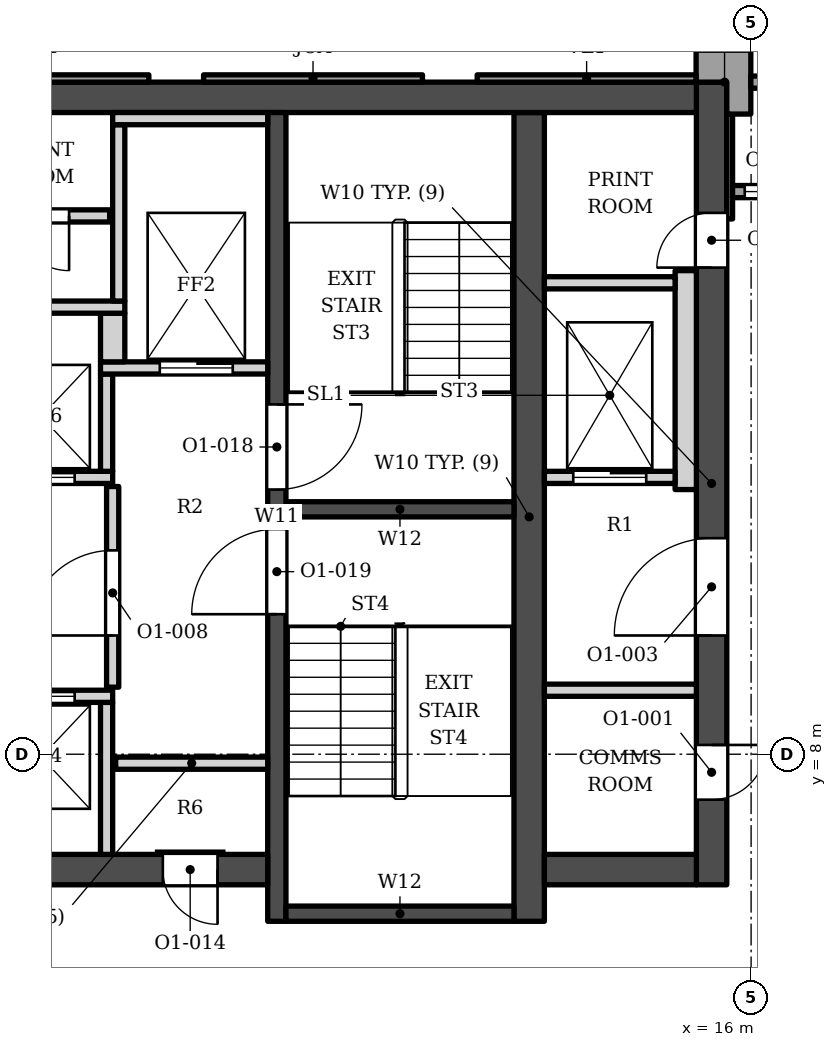
"""IFC4 building model, lengths in metres.
Left out: names, types, materials, properties, quantities, classifications, styles, units other than length and angle.
Written with IfcOpenShell. Run it as: python <this file> out.ifc"""

import sys

from ifc_helpers import new_model, si_unit, direction, frame, frame_2d, origin, place, context, subcontext, project, spatial, polyline, rectangle, outline, extrude, element, fill, save


model = new_model("IFC4")
c1 = context("Model", 3, precision=1e-05, world=origin(), true_north=direction((0.0, 1.0)))
c2 = subcontext(c1, "Body", "Model", "MODEL_VIEW")
j1 = project(units=[si_unit("LENGTHUNIT", "METRE"), si_unit("PLANEANGLEUNIT", "RADIAN")], contexts=[c1])
p1 = place(None, origin())
s1 = spatial("IfcSite", under=j1, at=p1, CompositionType="ELEMENT")
p2 = place(p1, origin())
s2 = spatial("IfcBuilding", under=s1, at=p2, CompositionType="ELEMENT")
p3 = place(p2, frame((0.0, 0.0, 144.6)))
s3 = spatial("IfcBuildingStorey", under=s2, at=p3, CompositionType="ELEMENT", Elevation=144.6)
p4 = place(p3, frame((-15.1, 18.802, 0.0), z_axis=(0.0, 0.0, 1.0), x_axis=(1.0, 0.0, 0.0)))
e1 = element("IfcWall", 1, at=p4, inside=s3, PredefinedType="SHEAR", context=c2, shape_type="SweptSolid", body=[
    extrude(rectangle(XDim=30.2, YDim=0.5, at=frame_2d((15.1, 0.0))), origin(), (0.0, 0.0, 1.0), 3.9),
])
p5 = place(p3, frame((12.35, 5.253, 0.0), z_axis=(0.0, 0.0, 1.0), x_axis=(0.0, 1.0, 0.0)))
e2 = element("IfcWall", 2, at=p5, inside=s3, PredefinedType="SHEAR", context=c2, shape_type="SweptSolid", body=[
    extrude(rectangle(XDim=13.3, YDim=0.5, at=frame_2d((6.65, 0.0))), origin(), (0.0, 0.0, 1.0), 3.9),
])
p6 = place(p3, frame((8.2, 5.253, 0.0), z_axis=(0.0, 0.0, 1.0), x_axis=(0.0, 1.0, 0.0)))
e3 = element("IfcWall", 3, at=p6, inside=s3, PredefinedType="SHEAR", context=c2, shape_type="SweptSolid", body=[
    extrude(rectangle(XDim=13.3, YDim=0.3, at=frame_2d((6.65, 0.0))), origin(), (0.0, 0.0, 1.0), 3.9),
])
p7 = place(p6, frame((7.1, 0.0, 0.0)))
e4 = element("IfcOpeningElement", 4, at=p7, cuts=e3, PredefinedType="OPENING", context=c2, shape_type="SweptSolid", body=[
    extrude(rectangle(XDim=1.4, YDim=2.1, at=frame_2d((0.7, 1.05))), frame((0.0, 0.16, 0.0), z_axis=(0.0, -1.0, 0.0), x_axis=(1.0, 0.0, 0.0)), (0.0, 0.0, 1.0), 0.32),
])
p8 = place(p6, frame((5.05, 0.0, 0.0)))
e5 = element("IfcOpeningElement", 5, at=p8, cuts=e3, PredefinedType="OPENING", context=c2, shape_type="SweptSolid", body=[
    extrude(rectangle(XDim=1.4, YDim=2.1, at=frame_2d((0.7, 1.05))), frame((0.0, 0.16, 0.0), z_axis=(0.0, -1.0, 0.0), x_axis=(1.0, 0.0, 0.0)), (0.0, 0.0, 1.0), 0.32),
])
for number, where, z_axis, x_axis in (
    (6, (8.35, 12.028, 0.0), (0.0, 0.0, 1.0), (1.0, 0.0, 0.0)),
    (7, (8.35, 5.378, 0.0), (0.0, 0.0, 1.0), (1.0, 0.0, 0.0)),
):
    element("IfcWall", number, at=place(p3, frame(where, z_axis=z_axis, x_axis=x_axis)), inside=s3, PredefinedType="SHEAR", context=c2, shape_type="SweptSolid", body=[
        extrude(rectangle(XDim=3.75, YDim=0.25, at=frame_2d((1.875, 0.0))), origin(), (0.0, 0.0, 1.0), 3.9),
    ])
p9 = place(p3, frame((1.0, 6.103, 0.0), z_axis=(0.0, 0.0, 1.0), x_axis=(1.0, 0.0, 0.0)))
e8 = element("IfcWall", 8, at=p9, inside=s3, PredefinedType="SHEAR", context=c2, shape_type="SweptSolid", body=[
    extrude(rectangle(XDim=7.05, YDim=0.5, at=frame_2d((3.525, 0.0))), origin(), (0.0, 0.0, 1.0), 3.9),
])
p10 = place(p9, frame((5.325, 0.0, 0.0)))
e9 = element("IfcOpeningElement", 9, at=p10, cuts=e8, PredefinedType="OPENING", context=c2, shape_type="SweptSolid", body=[
    extrude(rectangle(XDim=0.9, YDim=2.1, at=frame_2d((0.45, 1.05))), frame((0.0, 0.26, 0.0), z_axis=(0.0, -1.0, 0.0), x_axis=(1.0, 0.0, 0.0)), (0.0, 0.0, 1.0), 0.52),
])
p11 = place(p3, frame((12.6, 6.103, 0.0), z_axis=(0.0, 0.0, 1.0), x_axis=(1.0, 0.0, 0.0)))
e10 = element("IfcWall", 10, at=p11, inside=s3, PredefinedType="SHEAR", context=c2, shape_type="SweptSolid", body=[
    extrude(rectangle(XDim=2.5, YDim=0.5, at=frame_2d((1.25, 0.0))), origin(), (0.0, 0.0, 1.0), 3.9),
])
p12 = place(p3, frame((15.35, 5.853, 0.0), z_axis=(0.0, 0.0, 1.0), x_axis=(0.0, 1.0, 0.0)))
e11 = element("IfcWall", 11, at=p12, inside=s3, PredefinedType="SHEAR", context=c2, shape_type="SweptSolid", body=[
    extrude(rectangle(XDim=13.2, YDim=0.5, at=frame_2d((6.6, 0.0))), origin(), (0.0, 0.0, 1.0), 3.9),
])
p13 = place(p12, frame((4.1, 0.0, 0.0)))
e12 = element("IfcOpeningElement", 12, at=p13, cuts=e11, PredefinedType="OPENING", context=c2, shape_type="SweptSolid", body=[
    extrude(rectangle(XDim=1.6, YDim=2.1, at=frame_2d((0.8, 1.05))), frame((0.0, 0.26, 0.0), z_axis=(0.0, -1.0, 0.0), x_axis=(1.0, 0.0, 0.0)), (0.0, 0.0, 1.0), 0.52),
])
p14 = place(p12, frame((1.4, 0.0, 0.0)))
e13 = element("IfcOpeningElement", 13, at=p14, cuts=e11, PredefinedType="OPENING", context=c2, shape_type="SweptSolid", body=[
    extrude(rectangle(XDim=0.9, YDim=2.1, at=frame_2d((0.45, 1.05))), frame((0.0, 0.26, 0.0), z_axis=(0.0, -1.0, 0.0), x_axis=(1.0, 0.0, 0.0)), (0.0, 0.0, 1.0), 0.52),
])
p15 = place(p12, frame((10.15, 0.0, 0.0)))
e14 = element("IfcOpeningElement", 14, at=p15, cuts=e11, PredefinedType="OPENING", context=c2, shape_type="SweptSolid", body=[
    extrude(rectangle(XDim=0.9, YDim=2.1, at=frame_2d((0.45, 1.05))), frame((0.0, 0.26, 0.0), z_axis=(0.0, -1.0, 0.0), x_axis=(1.0, 0.0, 0.0)), (0.0, 0.0, 1.0), 0.52),
])
p16 = place(p3, origin())
e15 = element("IfcWall", 15, at=p16, inside=s3, PredefinedType="SOLIDWALL", context=c2, shape_type="SweptSolid", body=[
    extrude(outline(polyline([(15.995, 18.528), (15.995, 19.578), (15.095, 19.578), (15.095, 19.052), (15.6, 19.052), (15.6, 18.528), (15.995, 18.528)])), origin(), (0.0, 0.0, 1.0), 3.0),
])
p17 = place(p3, origin())
e16 = element("IfcWall", 16, at=p17, inside=s3, PredefinedType="SOLIDWALL", context=c2, shape_type="SweptSolid", body=[
    extrude(outline(polyline([(15.695, 18.528), (15.6, 18.528), (15.6, 16.802), (15.695, 16.802), (15.695, 18.528)])), origin(), (0.0, 0.0, 1.0), 3.0),
])
p18 = place(p3, frame((19.595, 19.052, 0.0), z_axis=(0.0, 0.0, 1.0), x_axis=(-1.0, 0.0, 0.0)))
e17 = element("IfcWall", 17, at=p18, inside=s3, PredefinedType="SOLIDWALL", context=c2, shape_type="SweptSolid", body=[
    extrude(rectangle(XDim=3.6, YDim=0.2, at=frame_2d((1.8, 0.0))), origin(), (0.0, 0.0, 1.0), 3.0),
])
p19 = place(p3, frame((19.895, 17.252, 0.0), z_axis=(0.0, 0.0, 1.0), x_axis=(-1.0, 0.0, 0.0)))
e18 = element("IfcWall", 18, at=p19, inside=s3, PredefinedType="ELEMENTEDWALL", context=c2, shape_type="SweptSolid", body=[
    extrude(rectangle(XDim=4.2, YDim=0.2, at=frame_2d((2.1, 0.0))), origin(), (0.0, 0.0, 1.0), 3.0),
])
p20 = place(p19, frame((0.2, 0.0, 0.45)))
e19 = element("IfcOpeningElement", 19, at=p20, cuts=e18, PredefinedType="OPENING", context=c2, shape_type="SweptSolid", body=[
    extrude(rectangle(XDim=2.4, YDim=2.25, at=frame_2d((1.2, 1.125))), frame((0.0, 0.11, 0.0), z_axis=(0.0, -1.0, 0.0), x_axis=(1.0, 0.0, 0.0)), (0.0, 0.0, 1.0), 0.22),
])
p21 = place(p19, frame((2.8, 0.0, 0.0)))
e20 = element("IfcOpeningElement", 20, at=p21, cuts=e18, PredefinedType="OPENING", context=c2, shape_type="SweptSolid", body=[
    extrude(rectangle(XDim=1.2, YDim=2.7, at=frame_2d((0.6, 1.35))), frame((0.0, 0.11, 0.0), z_axis=(0.0, -1.0, 0.0), x_axis=(1.0, 0.0, 0.0)), (0.0, 0.0, 1.0), 0.22),
])
p22 = place(p3, origin())
e21 = element("IfcWall", 21, at=p22, inside=s3, PredefinedType="ELEMENTEDWALL", context=c2, shape_type="SweptSolid", body=[
    extrude(outline(polyline([(11.495, 19.173), (11.495, 19.052), (15.095, 19.052), (15.095, 19.173), (11.495, 19.173)])), origin(), (0.0, 0.0, 1.0), 3.0),
])
p23 = place(p3, origin())
e22 = element("IfcWall", 22, at=p23, inside=s3, PredefinedType="SOLIDWALL", context=c2, shape_type="SweptSolid", body=[
    extrude(outline(polyline([(6.995, 19.173), (6.995, 19.052), (10.595, 19.052), (10.595, 19.173), (6.995, 19.173)])), origin(), (0.0, 0.0, 1.0), 3.0),
])
p24 = place(p3, origin())
e23 = element("IfcWall", 23, at=p24, inside=s3, PredefinedType="ELEMENTEDWALL", context=c2, shape_type="SweptSolid", body=[
    extrude(outline(polyline([(2.495, 19.173), (2.495, 19.052), (6.095, 19.052), (6.095, 19.173), (2.495, 19.173)])), origin(), (0.0, 0.0, 1.0), 3.0),
])
for number, where, z_axis, x_axis in (
    (24, (5.4, 6.353, 0.0), (0.0, 0.0, 1.0), (0.0, 1.0, 0.0)),
    (25, (5.55, 7.853, 0.0), (0.0, 0.0, 1.0), (1.0, 0.0, 0.0)),
):
    element("IfcWall", number, at=place(p3, frame(where, z_axis=z_axis, x_axis=x_axis)), inside=s3, PredefinedType="SOLIDWALL", context=c2, shape_type="SweptSolid", body=[
        extrude(rectangle(XDim=2.5, YDim=0.2, at=frame_2d((1.25, 0.0))), origin(), (0.0, 0.0, 1.0), 3.73),
    ])
p25 = place(p3, frame((1.0, 8.953, 0.0), z_axis=(0.0, 0.0, 1.0), x_axis=(1.0, 0.0, 0.0)))
e26 = element("IfcWall", 26, at=p25, inside=s3, PredefinedType="SOLIDWALL", context=c2, shape_type="SweptSolid", body=[
    extrude(rectangle(XDim=4.5, YDim=0.2, at=frame_2d((2.25, 0.0))), origin(), (0.0, 0.0, 1.0), 3.73),
])
p26 = place(p25, frame((0.625, 0.0, 0.0)))
e27 = element("IfcOpeningElement", 27, at=p26, cuts=e26, PredefinedType="OPENING", context=c2, shape_type="SweptSolid", body=[
    extrude(rectangle(XDim=1.1, YDim=2.1, at=frame_2d((0.55, 1.05))), frame((0.0, 0.11, 0.0), z_axis=(0.0, -1.0, 0.0), x_axis=(1.0, 0.0, 0.0)), (0.0, 0.0, 1.0), 0.22),
])
p27 = place(p25, frame((2.775, 0.0, 0.0)))
e28 = element("IfcOpeningElement", 28, at=p27, cuts=e26, PredefinedType="OPENING", context=c2, shape_type="SweptSolid", body=[
    extrude(rectangle(XDim=1.1, YDim=2.1, at=frame_2d((0.55, 1.05))), frame((0.0, 0.11, 0.0), z_axis=(0.0, -1.0, 0.0), x_axis=(1.0, 0.0, 0.0)), (0.0, 0.0, 1.0), 0.22),
])
p28 = place(p3, frame((12.6, 9.052, 0.0), z_axis=(0.0, 0.0, 1.0), x_axis=(1.0, 0.0, 0.0)))
e29 = element("IfcWall", 29, at=p28, inside=s3, PredefinedType="PARTITIONING", context=c2, shape_type="SweptSolid", body=[
    extrude(rectangle(XDim=2.5, YDim=0.2, at=frame_2d((1.25, 0.0))), origin(), (0.0, 0.0, 1.0), 3.73),
])
p29 = place(p3, frame((5.5, 9.103, 0.0), z_axis=(0.0, 0.0, 1.0), x_axis=(0.0, 1.0, 0.0)))
e30 = element("IfcWall", 30, at=p29, inside=s3, PredefinedType="SOLIDWALL", context=c2, shape_type="SweptSolid", body=[
    extrude(rectangle(XDim=3.3, YDim=0.2, at=frame_2d((1.65, 0.0))), origin(), (0.0, 0.0, 1.0), 3.73),
])
p30 = place(p29, frame((0.85, 0.0, 0.0)))
e31 = element("IfcOpeningElement", 31, at=p30, cuts=e30, PredefinedType="OPENING", context=c2, shape_type="SweptSolid", body=[
    extrude(rectangle(XDim=1.4, YDim=2.1, at=frame_2d((0.7, 1.05))), frame((0.0, 0.11, 0.0), z_axis=(0.0, -1.0, 0.0), x_axis=(1.0, 0.0, 0.0)), (0.0, 0.0, 1.0), 0.22),
])
p31 = place(p3, frame((14.925, 12.353, 0.0), z_axis=(0.0, 0.0, 1.0), x_axis=(0.0, 1.0, 0.0)))
e32 = element("IfcWall", 32, at=p31, inside=s3, PredefinedType="SOLIDWALL", context=c2, shape_type="SweptSolid", body=[
    extrude(rectangle(XDim=3.6, YDim=0.35, at=frame_2d((1.8, 0.0))), origin(), (0.0, 0.0, 1.0), 3.73),
])
p32 = place(p3, frame((-1.5, 12.552, 0.0), z_axis=(0.0, 0.0, 1.0), x_axis=(1.0, 0.0, 0.0)))
e33 = element("IfcWall", 33, at=p32, inside=s3, PredefinedType="SOLIDWALL", context=c2, shape_type="SweptSolid", body=[
    extrude(rectangle(XDim=7.0, YDim=0.2, at=frame_2d((3.5, 0.0))), origin(), (0.0, 0.0, 1.0), 3.73),
])
p33 = place(p32, frame((3.075, 0.0, 0.0)))
e34 = element("IfcOpeningElement", 34, at=p33, cuts=e33, PredefinedType="OPENING", context=c2, shape_type="SweptSolid", body=[
    extrude(rectangle(XDim=1.1, YDim=2.1, at=frame_2d((0.55, 1.05))), frame((0.0, 0.11, 0.0), z_axis=(0.0, -1.0, 0.0), x_axis=(1.0, 0.0, 0.0)), (0.0, 0.0, 1.0), 0.22),
])
p34 = place(p32, frame((5.275, 0.0, 0.0)))
e35 = element("IfcOpeningElement", 35, at=p34, cuts=e33, PredefinedType="OPENING", context=c2, shape_type="SweptSolid", body=[
    extrude(rectangle(XDim=1.1, YDim=2.1, at=frame_2d((0.55, 1.05))), frame((0.0, 0.11, 0.0), z_axis=(0.0, -1.0, 0.0), x_axis=(1.0, 0.0, 0.0)), (0.0, 0.0, 1.0), 0.22),
])
p35 = place(p3, frame((12.6, 12.552, 0.0), z_axis=(0.0, 0.0, 1.0), x_axis=(1.0, 0.0, 0.0)))
e36 = element("IfcWall", 36, at=p35, inside=s3, PredefinedType="SOLIDWALL", context=c2, shape_type="SweptSolid", body=[
    extrude(rectangle(XDim=2.15, YDim=0.2, at=frame_2d((1.075, 0.0))), origin(), (0.0, 0.0, 1.0), 3.73),
])
p36 = place(p35, frame((0.475, 0.0, 0.0)))
e37 = element("IfcOpeningElement", 37, at=p36, cuts=e36, PredefinedType="OPENING", context=c2, shape_type="SweptSolid", body=[
    extrude(rectangle(XDim=1.2, YDim=2.1, at=frame_2d((0.6, 1.05))), frame((0.0, 0.11, 0.0), z_axis=(0.0, -1.0, 0.0), x_axis=(1.0, 0.0, 0.0)), (0.0, 0.0, 1.0), 0.22),
])
p37 = place(p3, frame((5.4, 12.653, 0.0), z_axis=(0.0, 0.0, 1.0), x_axis=(0.0, 1.0, 0.0)))
e38 = element("IfcWall", 38, at=p37, inside=s3, PredefinedType="SOLIDWALL", context=c2, shape_type="SweptSolid", body=[
    extrude(rectangle(XDim=1.6, YDim=0.2, at=frame_2d((0.8, 0.0))), origin(), (0.0, 0.0, 1.0), 3.73),
])
p38 = place(p3, frame((5.3, 14.353, 0.0), z_axis=(0.0, 0.0, 1.0), x_axis=(1.0, 0.0, 0.0)))
e39 = element("IfcWall", 39, at=p38, inside=s3, PredefinedType="SOLIDWALL", context=c2, shape_type="SweptSolid", body=[
    extrude(rectangle(XDim=2.75, YDim=0.2, at=frame_2d((1.375, 0.0))), origin(), (0.0, 0.0, 1.0), 3.73),
])
p39 = place(p38, frame((0.975, 0.0, 0.0)))
e40 = element("IfcOpeningElement", 40, at=p39, cuts=e39, PredefinedType="OPENING", context=c2, shape_type="SweptSolid", body=[
    extrude(rectangle(XDim=1.2, YDim=2.1, at=frame_2d((0.6, 1.05))), frame((0.0, 0.11, 0.0), z_axis=(0.0, -1.0, 0.0), x_axis=(1.0, 0.0, 0.0)), (0.0, 0.0, 1.0), 0.22),
])
p40 = place(p3, frame((5.5, 14.453, 0.0), z_axis=(0.0, 0.0, 1.0), x_axis=(0.0, 1.0, 0.0)))
e41 = element("IfcWall", 41, at=p40, inside=s3, PredefinedType="SOLIDWALL", context=c2, shape_type="SweptSolid", body=[
    extrude(rectangle(XDim=0.8, YDim=0.4, at=frame_2d((0.4, 0.0))), origin(), (0.0, 0.0, 1.0), 3.73),
])
p41 = place(p3, frame((-1.5, 15.353, 0.0), z_axis=(0.0, 0.0, 1.0), x_axis=(1.0, 0.0, 0.0)))
e42 = element("IfcWall", 42, at=p41, inside=s3, PredefinedType="SOLIDWALL", context=c2, shape_type="SweptSolid", body=[
    extrude(rectangle(XDim=7.2, YDim=0.2, at=frame_2d((3.6, 0.0))), origin(), (0.0, 0.0, 1.0), 3.73),
])
p42 = place(p3, frame((5.6, 15.453, 0.0), z_axis=(0.0, 0.0, 1.0), x_axis=(0.0, 1.0, 0.0)))
e43 = element("IfcWall", 43, at=p42, inside=s3, PredefinedType="SOLIDWALL", context=c2, shape_type="SweptSolid", body=[
    extrude(rectangle(XDim=2.9, YDim=0.2, at=frame_2d((1.45, 0.0))), origin(), (0.0, 0.0, 1.0), 3.73),
])
p43 = place(p3, frame((12.6, 15.753, 0.0), z_axis=(0.0, 0.0, 1.0), x_axis=(1.0, 0.0, 0.0)))
e44 = element("IfcWall", 44, at=p43, inside=s3, PredefinedType="SOLIDWALL", context=c2, shape_type="SweptSolid", body=[
    extrude(rectangle(XDim=2.15, YDim=0.2, at=frame_2d((1.075, 0.0))), origin(), (0.0, 0.0, 1.0), 3.73),
])
p44 = place(p3, frame((-1.6, 16.853, 0.0), z_axis=(0.0, 0.0, 1.0), x_axis=(1.0, 0.0, 0.0)))
e45 = element("IfcWall", 45, at=p44, inside=s3, PredefinedType="SOLIDWALL", context=c2, shape_type="SweptSolid", body=[
    extrude(rectangle(XDim=7.05, YDim=0.2, at=frame_2d((3.525, 0.0))), origin(), (0.0, 0.0, 1.0), 3.73),
])
p45 = place(p44, frame((0.817, 0.0, 0.0)))
e46 = element("IfcOpeningElement", 46, at=p45, cuts=e45, PredefinedType="OPENING", context=c2, shape_type="SweptSolid", body=[
    extrude(rectangle(XDim=0.9, YDim=2.1, at=frame_2d((0.45, 1.05))), frame((0.0, 0.11, 0.0), z_axis=(0.0, -1.0, 0.0), x_axis=(1.0, 0.0, 0.0)), (0.0, 0.0, 1.0), 0.22),
])
p46 = place(p44, frame((3.15, 0.0, 0.0)))
e47 = element("IfcOpeningElement", 47, at=p46, cuts=e45, PredefinedType="OPENING", context=c2, shape_type="SweptSolid", body=[
    extrude(rectangle(XDim=0.9, YDim=2.1, at=frame_2d((0.45, 1.05))), frame((0.0, 0.11, 0.0), z_axis=(0.0, -1.0, 0.0), x_axis=(1.0, 0.0, 0.0)), (0.0, 0.0, 1.0), 0.22),
])
p47 = place(p44, frame((5.483, 0.0, 0.0)))
e48 = element("IfcOpeningElement", 48, at=p47, cuts=e45, PredefinedType="OPENING", context=c2, shape_type="SweptSolid", body=[
    extrude(rectangle(XDim=0.9, YDim=2.1, at=frame_2d((0.45, 1.05))), frame((0.0, 0.11, 0.0), z_axis=(0.0, -1.0, 0.0), x_axis=(1.0, 0.0, 0.0)), (0.0, 0.0, 1.0), 0.22),
])
p48 = place(p3, frame((5.5, 18.453, 0.0), z_axis=(0.0, 0.0, 1.0), x_axis=(1.0, 0.0, 0.0)))
e49 = element("IfcWall", 49, at=p48, inside=s3, PredefinedType="SOLIDWALL", context=c2, shape_type="SweptSolid", body=[
    extrude(rectangle(XDim=2.55, YDim=0.2, at=frame_2d((1.275, 0.0))), origin(), (0.0, 0.0, 1.0), 3.73),
])
p49 = place(p21, origin())
e50 = element("IfcDoor", 50, at=p49, inside=s3, OperationType="SINGLE_SWING_LEFT", PredefinedType="DOOR", context=c2, shape_type="SweptSolid", body=[
    extrude(rectangle(XDim=1.2, YDim=2.7, at=frame_2d((0.6, 1.35))), frame((0.0, 0.025, 0.0), z_axis=(0.0, -1.0, 0.0), x_axis=(1.0, 0.0, 0.0)), (0.0, 0.0, 1.0), 0.05),
])
fill(e20, e50)
p50 = place(p27, origin())
e51 = element("IfcDoor", 51, at=p50, inside=s3, OperationType="DOUBLE_DOOR_SLIDING", PredefinedType="DOOR", context=c2, shape_type="SweptSolid", body=[
    extrude(rectangle(XDim=1.1, YDim=2.1, at=frame_2d((0.55, 1.05))), frame((0.0, 0.025, 0.0), z_axis=(0.0, -1.0, 0.0), x_axis=(1.0, 0.0, 0.0)), (0.0, 0.0, 1.0), 0.05),
])
fill(e28, e51)
p51 = place(p34, origin())
e52 = element("IfcDoor", 52, at=p51, inside=s3, OperationType="DOUBLE_DOOR_SLIDING", PredefinedType="DOOR", context=c2, shape_type="SweptSolid", body=[
    extrude(rectangle(XDim=1.1, YDim=2.1, at=frame_2d((0.55, 1.05))), frame((0.0, 0.025, 0.0), z_axis=(0.0, -1.0, 0.0), x_axis=(1.0, 0.0, 0.0)), (0.0, 0.0, 1.0), 0.05),
])
fill(e35, e52)
p52 = place(p39, origin())
e53 = element("IfcDoor", 53, at=p52, inside=s3, OperationType="DOUBLE_DOOR_SLIDING", PredefinedType="DOOR", context=c2, shape_type="SweptSolid", body=[
    extrude(rectangle(XDim=1.2, YDim=2.1, at=frame_2d((0.6, 1.05))), frame((0.0, 0.025, 0.0), z_axis=(0.0, -1.0, 0.0), x_axis=(1.0, 0.0, 0.0)), (0.0, 0.0, 1.0), 0.05),
])
fill(e40, e53)
p53 = place(p36, origin())
e54 = element("IfcDoor", 54, at=p53, inside=s3, OperationType="DOUBLE_DOOR_SLIDING", PredefinedType="DOOR", context=c2, shape_type="SweptSolid", body=[
    extrude(rectangle(XDim=1.2, YDim=2.1, at=frame_2d((0.6, 1.05))), frame((0.0, 0.025, 0.0), z_axis=(0.0, -1.0, 0.0), x_axis=(1.0, 0.0, 0.0)), (0.0, 0.0, 1.0), 0.05),
])
fill(e37, e54)
p54 = place(p7, origin())
e55 = element("IfcDoor", 55, at=p54, inside=s3, OperationType="SINGLE_SWING_RIGHT", PredefinedType="DOOR", context=c2, shape_type="SweptSolid", body=[
    extrude(rectangle(XDim=1.4, YDim=2.1, at=frame_2d((0.7, 1.05))), frame((0.0, 0.025, 0.0), z_axis=(0.0, -1.0, 0.0), x_axis=(1.0, 0.0, 0.0)), (0.0, 0.0, 1.0), 0.05),
])
fill(e4, e55)
p55 = place(p8, origin())
e56 = element("IfcDoor", 56, at=p55, inside=s3, OperationType="SINGLE_SWING_LEFT", PredefinedType="DOOR", context=c2, shape_type="SweptSolid", body=[
    extrude(rectangle(XDim=1.4, YDim=2.1, at=frame_2d((0.7, 1.05))), frame((0.0, 0.025, 0.0), z_axis=(0.0, -1.0, 0.0), x_axis=(1.0, 0.0, 0.0)), (0.0, 0.0, 1.0), 0.05),
])
fill(e5, e56)
p56 = place(p30, origin())
e57 = element("IfcDoor", 57, at=p56, inside=s3, OperationType="SINGLE_SWING_LEFT", PredefinedType="DOOR", context=c2, shape_type="SweptSolid", body=[
    extrude(rectangle(XDim=1.4, YDim=2.1, at=frame_2d((0.7, 1.05))), frame((0.0, 0.025, 0.0), z_axis=(0.0, -1.0, 0.0), x_axis=(1.0, 0.0, 0.0)), (0.0, 0.0, 1.0), 0.05),
])
fill(e31, e57)
p57 = place(p47, origin())
e58 = element("IfcDoor", 58, at=p57, inside=s3, OperationType="SINGLE_SWING_RIGHT", PredefinedType="DOOR", context=c2, shape_type="SweptSolid", body=[
    extrude(rectangle(XDim=0.9, YDim=2.1, at=frame_2d((0.45, 1.05))), frame((0.0, 0.025, 0.0), z_axis=(0.0, -1.0, 0.0), x_axis=(1.0, 0.0, 0.0)), (0.0, 0.0, 1.0), 0.05),
])
fill(e48, e58)
p58 = place(p10, origin())
e59 = element("IfcDoor", 59, at=p58, inside=s3, OperationType="SINGLE_SWING_RIGHT", PredefinedType="DOOR", context=c2, shape_type="SweptSolid", body=[
    extrude(rectangle(XDim=0.9, YDim=2.1, at=frame_2d((0.45, 1.05))), frame((0.0, 0.025, 0.0), z_axis=(0.0, -1.0, 0.0), x_axis=(1.0, 0.0, 0.0)), (0.0, 0.0, 1.0), 0.05),
])
fill(e9, e59)
p59 = place(p13, origin())
e60 = element("IfcDoor", 60, at=p59, inside=s3, OperationType="DOUBLE_DOOR_SINGLE_SWING", PredefinedType="DOOR", context=c2, shape_type="SweptSolid", body=[
    extrude(rectangle(XDim=1.6, YDim=2.1, at=frame_2d((0.8, 1.05))), frame((0.0, 0.025, 0.0), z_axis=(0.0, -1.0, 0.0), x_axis=(1.0, 0.0, 0.0)), (0.0, 0.0, 1.0), 0.05),
])
fill(e12, e60)
p60 = place(p14, origin())
e61 = element("IfcDoor", 61, at=p60, inside=s3, OperationType="SINGLE_SWING_RIGHT", PredefinedType="DOOR", context=c2, shape_type="SweptSolid", body=[
    extrude(rectangle(XDim=0.9, YDim=2.1, at=frame_2d((0.45, 1.05))), frame((0.0, 0.025, 0.0), z_axis=(0.0, -1.0, 0.0), x_axis=(1.0, 0.0, 0.0)), (0.0, 0.0, 1.0), 0.05),
])
fill(e13, e61)
p61 = place(p15, origin())
e62 = element("IfcDoor", 62, at=p61, inside=s3, OperationType="SINGLE_SWING_LEFT", PredefinedType="DOOR", context=c2, shape_type="SweptSolid", body=[
    extrude(rectangle(XDim=0.9, YDim=2.1, at=frame_2d((0.45, 1.05))), frame((0.0, 0.025, 0.0), z_axis=(0.0, -1.0, 0.0), x_axis=(1.0, 0.0, 0.0)), (0.0, 0.0, 1.0), 0.05),
])
fill(e14, e62)
save(model, sys.argv[1])
